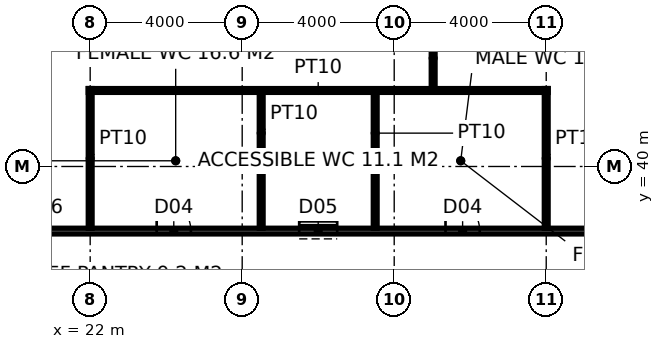
"""IFC4 building model, lengths in metres.
Left out: names, types, materials, properties, quantities, classifications, styles, units other than length and angle.
Written with IfcOpenShell. Run it as: python <this file> out.ifc"""

import sys

from ifc_helpers import new_model, si_unit, direction, frame, frame_2d, origin, place, context, subcontext, project, spatial, rectangle, extrude, element, fill, save


model = new_model("IFC4")
c1 = context("Model", 3, precision=1e-05, world=origin(), true_north=direction((0.0, 1.0)))
c2 = subcontext(c1, "Body", "Model", "MODEL_VIEW")
j1 = project(units=[si_unit("LENGTHUNIT", "METRE"), si_unit("PLANEANGLEUNIT", "RADIAN")], contexts=[c1])
p1 = place(None, origin())
s1 = spatial("IfcSite", under=j1, at=p1, CompositionType="ELEMENT")
p2 = place(p1, origin())
s2 = spatial("IfcBuilding", under=s1, at=p2, CompositionType="ELEMENT")
p3 = place(p2, frame((0.0, 0.0, 246.2)))
s3 = spatial("IfcBuildingStorey", under=s2, at=p3, CompositionType="ELEMENT", Elevation=246.2)
p4 = place(p3, frame((17.5, 38.3, 0.0), z_axis=(0.0, 0.0, 1.0), x_axis=(1.0, 0.0, 0.0)))
e1 = element("IfcWall", 1, at=p4, inside=s3, PredefinedType="PARTITIONING", context=c2, shape_type="SweptSolid", body=[
    extrude(rectangle(XDim=20.925, YDim=0.15, at=frame_2d((10.462, 0.0))), origin(), (0.0, 0.0, 1.0), 3.85),
])
p5 = place(p4, frame((6.25, 0.0, 0.0)))
e2 = element("IfcOpeningElement", 2, at=p5, cuts=e1, PredefinedType="OPENING", context=c2, shape_type="SweptSolid", body=[
    extrude(rectangle(XDim=0.9, YDim=2.1, at=frame_2d((0.45, 1.05))), frame((0.0, 0.085, 0.0), z_axis=(0.0, -1.0, 0.0), x_axis=(1.0, 0.0, 0.0)), (0.0, 0.0, 1.0), 0.17),
])
p6 = place(p4, frame((10.0, 0.0, 0.0)))
e3 = element("IfcOpeningElement", 3, at=p6, cuts=e1, PredefinedType="OPENING", context=c2, shape_type="SweptSolid", body=[
    extrude(rectangle(XDim=1.0, YDim=2.1, at=frame_2d((0.5, 1.05))), frame((0.0, 0.085, 0.0), z_axis=(0.0, -1.0, 0.0), x_axis=(1.0, 0.0, 0.0)), (0.0, 0.0, 1.0), 0.17),
])
p7 = place(p4, frame((13.85, 0.0, 0.0)))
e4 = element("IfcOpeningElement", 4, at=p7, cuts=e1, PredefinedType="OPENING", context=c2, shape_type="SweptSolid", body=[
    extrude(rectangle(XDim=0.9, YDim=2.1, at=frame_2d((0.45, 1.05))), frame((0.0, 0.085, 0.0), z_axis=(0.0, -1.0, 0.0), x_axis=(1.0, 0.0, 0.0)), (0.0, 0.0, 1.0), 0.17),
])
for number, where, z_axis, x_axis in (
    (5, (22.0, 38.375, 0.0), (0.0, 0.0, 1.0), (0.0, 1.0, 0.0)),
    (6, (34.0, 38.375, 0.0), (0.0, 0.0, 1.0), (0.0, 1.0, 0.0)),
):
    element("IfcWall", number, at=place(p3, frame(where, z_axis=z_axis, x_axis=x_axis)), inside=s3, PredefinedType="PARTITIONING", context=c2, shape_type="SweptSolid", body=[
        extrude(rectangle(XDim=3.675, YDim=0.1, at=frame_2d((1.837, 0.0))), origin(), (0.0, 0.0, 1.0), 2.95),
    ])
p8 = place(p3, frame((21.95, 42.0, 0.0), z_axis=(0.0, 0.0, 1.0), x_axis=(1.0, 0.0, 0.0)))
e7 = element("IfcWall", 7, at=p8, inside=s3, PredefinedType="PARTITIONING", context=c2, shape_type="SweptSolid", body=[
    extrude(rectangle(XDim=12.1, YDim=0.1, at=frame_2d((6.05, 0.0))), origin(), (0.0, 0.0, 1.0), 3.85),
])
for number, where, z_axis, x_axis in (
    (8, (26.5, 38.375, 0.0), (0.0, 0.0, 1.0), (0.0, 1.0, 0.0)),
    (9, (29.5, 38.375, 0.0), (0.0, 0.0, 1.0), (0.0, 1.0, 0.0)),
):
    element("IfcWall", number, at=place(p3, frame(where, z_axis=z_axis, x_axis=x_axis)), inside=s3, PredefinedType="PARTITIONING", context=c2, shape_type="SweptSolid", body=[
        extrude(rectangle(XDim=3.575, YDim=0.1, at=frame_2d((1.788, 0.0))), origin(), (0.0, 0.0, 1.0), 3.85),
    ])
p9 = place(p3, frame((31.025, 43.7, 0.0), z_axis=(0.0, 0.0, 1.0), x_axis=(0.0, -1.0, 0.0)))
e10 = element("IfcWall", 10, at=p9, inside=s3, PredefinedType="PARTITIONING", context=c2, shape_type="SweptSolid", body=[
    extrude(rectangle(XDim=1.7, YDim=0.1, at=frame_2d((0.85, 0.0))), origin(), (0.0, 0.0, 1.0), 3.85),
])
p10 = place(p5, origin())
e11 = element("IfcDoor", 11, at=p10, inside=s3, OperationType="SINGLE_SWING_LEFT", PredefinedType="DOOR", context=c2, shape_type="SweptSolid", body=[
    extrude(rectangle(XDim=0.9, YDim=2.1, at=frame_2d((0.45, 1.05))), frame((0.0, 0.025, 0.0), z_axis=(0.0, -1.0, 0.0), x_axis=(1.0, 0.0, 0.0)), (0.0, 0.0, 1.0), 0.05),
])
fill(e2, e11)
p11 = place(p6, origin())
e12 = element("IfcDoor", 12, at=p11, inside=s3, OperationType="SLIDING_TO_LEFT", PredefinedType="DOOR", context=c2, shape_type="SweptSolid", body=[
    extrude(rectangle(XDim=1.0, YDim=2.1, at=frame_2d((0.5, 1.05))), frame((0.0, 0.025, 0.0), z_axis=(0.0, -1.0, 0.0), x_axis=(1.0, 0.0, 0.0)), (0.0, 0.0, 1.0), 0.05),
])
fill(e3, e12)
p12 = place(p7, origin())
e13 = element("IfcDoor", 13, at=p12, inside=s3, OperationType="SINGLE_SWING_LEFT", PredefinedType="DOOR", context=c2, shape_type="SweptSolid", body=[
    extrude(rectangle(XDim=0.9, YDim=2.1, at=frame_2d((0.45, 1.05))), frame((0.0, 0.025, 0.0), z_axis=(0.0, -1.0, 0.0), x_axis=(1.0, 0.0, 0.0)), (0.0, 0.0, 1.0), 0.05),
])
fill(e4, e13)
save(model, sys.argv[1])
